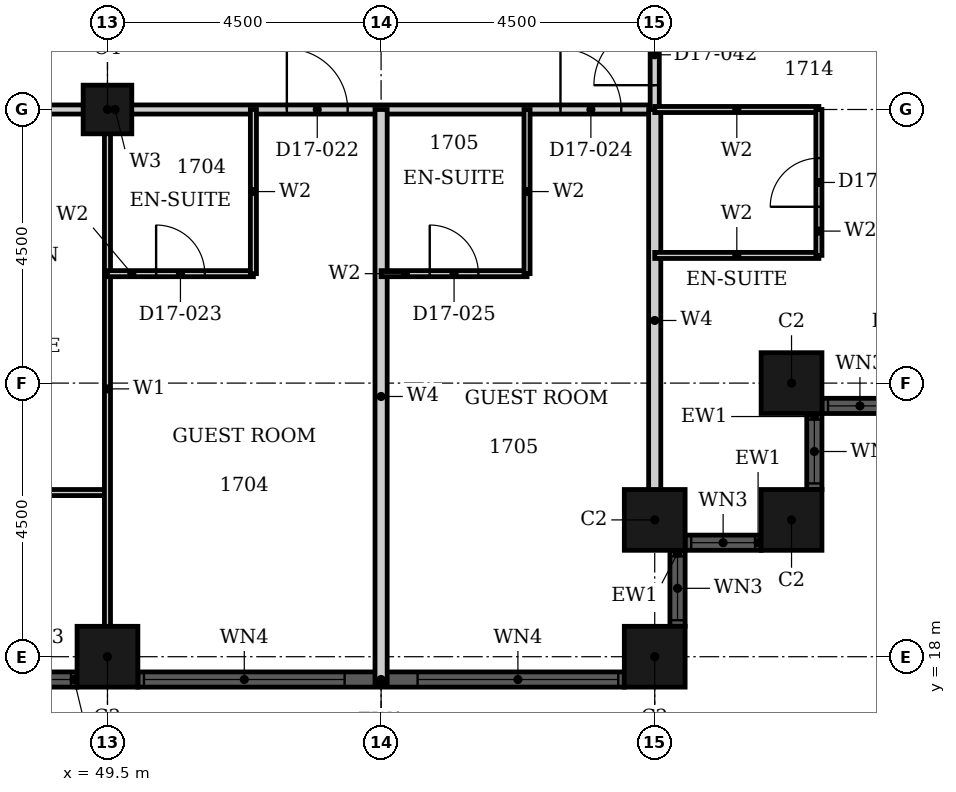
"""IFC4 building model, lengths in metres.
Left out: names, types, materials, properties, quantities, classifications, styles, units other than length and angle.
Written with IfcOpenShell. Run it as: python <this file> out.ifc"""

import sys

from ifc_helpers import new_model, si_unit, direction, frame, frame_2d, origin, origin_2d, place, context, subcontext, project, spatial, rectangle, hollow_rectangle, extrude, element, fill, save


model = new_model("IFC4")
c1 = context("Model", 3, precision=1e-05, world=origin(), true_north=direction((0.0, 1.0)))
c2 = subcontext(c1, "Body", "Model", "MODEL_VIEW")
j1 = project(units=[si_unit("LENGTHUNIT", "METRE"), si_unit("PLANEANGLEUNIT", "RADIAN")], contexts=[c1])
p1 = place(None, origin())
s1 = spatial("IfcSite", under=j1, at=p1, CompositionType="ELEMENT")
p2 = place(p1, origin())
s2 = spatial("IfcBuilding", under=s1, at=p2, CompositionType="ELEMENT")
p3 = place(p2, frame((0.0, 0.0, 74.4)))
s3 = spatial("IfcBuildingStorey", under=s2, at=p3, CompositionType="ELEMENT", Elevation=74.4)
for number, where, z_axis, x_axis in (
    (1, (49.5, 18.0, 0.0), (0.0, 0.0, 1.0), (1.0, 0.0, 0.0)),
    (2, (58.5, 18.0, 0.0), (0.0, 0.0, 1.0), (1.0, 0.0, 0.0)),
    (3, (58.5, 20.25, 0.0), (0.0, 0.0, 1.0), (1.0, 0.0, 0.0)),
    (4, (60.75, 20.25, 0.0), (0.0, 0.0, 1.0), (1.0, 0.0, 0.0)),
    (5, (60.75, 22.5, 0.0), (0.0, 0.0, 1.0), (1.0, 0.0, 0.0)),
):
    element("IfcColumn", number, at=place(p3, frame(where, z_axis=z_axis, x_axis=x_axis)), inside=s3, PredefinedType="COLUMN", context=c2, shape_type="SweptSolid", body=[
        extrude(hollow_rectangle(XDim=1.0, YDim=1.0, WallThickness=0.032, at=origin_2d()), origin(), (0.0, 0.0, 1.0), 3.6),
    ])
p4 = place(p3, frame((49.5, 27.0, 0.0), z_axis=(0.0, 0.0, 1.0), x_axis=(1.0, 0.0, 0.0)))
e6 = element("IfcColumn", 6, at=p4, inside=s3, PredefinedType="COLUMN", context=c2, shape_type="SweptSolid", body=[
    extrude(hollow_rectangle(XDim=0.8, YDim=0.8, WallThickness=0.025, at=origin_2d()), origin(), (0.0, 0.0, 1.0), 3.6),
])
p5 = place(p3, frame((47.75, 17.625, 0.0), z_axis=(0.0, 0.0, 1.0), x_axis=(1.0, 0.0, 0.0)))
e7 = element("IfcWall", 7, at=p5, inside=s3, PredefinedType="SOLIDWALL", context=c2, shape_type="SweptSolid", body=[
    extrude(rectangle(XDim=1.25, YDim=0.25, at=frame_2d((0.625, 0.0))), origin(), (0.0, 0.0, 1.0), 3.6),
])
p6 = place(p5, frame((0.1, 0.0, 0.9)))
e8 = element("IfcOpeningElement", 8, at=p6, cuts=e7, PredefinedType="OPENING", context=c2, shape_type="SweptSolid", body=[
    extrude(rectangle(XDim=1.05, YDim=2.08, at=frame_2d((0.525, 1.04))), frame((0.0, 0.135, 0.0), z_axis=(0.0, -1.0, 0.0), x_axis=(1.0, 0.0, 0.0)), (0.0, 0.0, 1.0), 0.27),
])
p7 = place(p3, frame((50.0, 17.625, 0.0), z_axis=(0.0, 0.0, 1.0), x_axis=(1.0, 0.0, 0.0)))
e9 = element("IfcWall", 9, at=p7, inside=s3, PredefinedType="SOLIDWALL", context=c2, shape_type="SweptSolid", body=[
    extrude(rectangle(XDim=8.0, YDim=0.25, at=frame_2d((4.0, 0.0))), origin(), (0.0, 0.0, 1.0), 3.6),
])
p8 = place(p7, frame((0.1, 0.0, 0.9)))
e10 = element("IfcOpeningElement", 10, at=p8, cuts=e9, PredefinedType="OPENING", context=c2, shape_type="SweptSolid", body=[
    extrude(rectangle(XDim=3.3, YDim=2.08, at=frame_2d((1.65, 1.04))), frame((0.0, 0.135, 0.0), z_axis=(0.0, -1.0, 0.0), x_axis=(1.0, 0.0, 0.0)), (0.0, 0.0, 1.0), 0.27),
])
p9 = place(p7, frame((4.6, 0.0, 0.9)))
e11 = element("IfcOpeningElement", 11, at=p9, cuts=e9, PredefinedType="OPENING", context=c2, shape_type="SweptSolid", body=[
    extrude(rectangle(XDim=3.3, YDim=2.08, at=frame_2d((1.65, 1.04))), frame((0.0, 0.135, 0.0), z_axis=(0.0, -1.0, 0.0), x_axis=(1.0, 0.0, 0.0)), (0.0, 0.0, 1.0), 0.27),
])
p10 = place(p3, frame((58.875, 18.5, 0.0), z_axis=(0.0, 0.0, 1.0), x_axis=(0.0, 1.0, 0.0)))
e12 = element("IfcWall", 12, at=p10, inside=s3, PredefinedType="SOLIDWALL", context=c2, shape_type="SweptSolid", body=[
    extrude(rectangle(XDim=1.25, YDim=0.25, at=frame_2d((0.625, 0.0))), origin(), (0.0, 0.0, 1.0), 3.6),
])
p11 = place(p10, frame((0.1, 0.0, 0.9)))
e13 = element("IfcOpeningElement", 13, at=p11, cuts=e12, PredefinedType="OPENING", context=c2, shape_type="SweptSolid", body=[
    extrude(rectangle(XDim=1.05, YDim=2.08, at=frame_2d((0.525, 1.04))), frame((0.0, 0.135, 0.0), z_axis=(0.0, -1.0, 0.0), x_axis=(1.0, 0.0, 0.0)), (0.0, 0.0, 1.0), 0.27),
])
p12 = place(p3, frame((59.0, 19.875, 0.0), z_axis=(0.0, 0.0, 1.0), x_axis=(1.0, 0.0, 0.0)))
e14 = element("IfcWall", 14, at=p12, inside=s3, PredefinedType="SOLIDWALL", context=c2, shape_type="SweptSolid", body=[
    extrude(rectangle(XDim=1.25, YDim=0.25, at=frame_2d((0.625, 0.0))), origin(), (0.0, 0.0, 1.0), 3.6),
])
p13 = place(p12, frame((0.1, 0.0, 0.9)))
e15 = element("IfcOpeningElement", 15, at=p13, cuts=e14, PredefinedType="OPENING", context=c2, shape_type="SweptSolid", body=[
    extrude(rectangle(XDim=1.05, YDim=2.08, at=frame_2d((0.525, 1.04))), frame((0.0, 0.135, 0.0), z_axis=(0.0, -1.0, 0.0), x_axis=(1.0, 0.0, 0.0)), (0.0, 0.0, 1.0), 0.27),
])
p14 = place(p3, frame((61.125, 20.75, 0.0), z_axis=(0.0, 0.0, 1.0), x_axis=(0.0, 1.0, 0.0)))
e16 = element("IfcWall", 16, at=p14, inside=s3, PredefinedType="SOLIDWALL", context=c2, shape_type="SweptSolid", body=[
    extrude(rectangle(XDim=1.25, YDim=0.25, at=frame_2d((0.625, 0.0))), origin(), (0.0, 0.0, 1.0), 3.6),
])
p15 = place(p14, frame((0.1, 0.0, 0.9)))
e17 = element("IfcOpeningElement", 17, at=p15, cuts=e16, PredefinedType="OPENING", context=c2, shape_type="SweptSolid", body=[
    extrude(rectangle(XDim=1.05, YDim=2.08, at=frame_2d((0.525, 1.04))), frame((0.0, 0.135, 0.0), z_axis=(0.0, -1.0, 0.0), x_axis=(1.0, 0.0, 0.0)), (0.0, 0.0, 1.0), 0.27),
])
p16 = place(p3, frame((61.25, 22.125, 0.0), z_axis=(0.0, 0.0, 1.0), x_axis=(1.0, 0.0, 0.0)))
e18 = element("IfcWall", 18, at=p16, inside=s3, PredefinedType="SOLIDWALL", context=c2, shape_type="SweptSolid", body=[
    extrude(rectangle(XDim=1.25, YDim=0.25, at=frame_2d((0.625, 0.0))), origin(), (0.0, 0.0, 1.0), 3.6),
])
p17 = place(p16, frame((0.1, 0.0, 0.9)))
e19 = element("IfcOpeningElement", 19, at=p17, cuts=e18, PredefinedType="OPENING", context=c2, shape_type="SweptSolid", body=[
    extrude(rectangle(XDim=1.05, YDim=2.08, at=frame_2d((0.525, 1.04))), frame((0.0, 0.135, 0.0), z_axis=(0.0, -1.0, 0.0), x_axis=(1.0, 0.0, 0.0)), (0.0, 0.0, 1.0), 0.27),
])
p18 = place(p3, frame((46.8, 27.0, 0.0), z_axis=(0.0, 0.0, 1.0), x_axis=(1.0, 0.0, 0.0)))
e20 = element("IfcWall", 20, at=p18, inside=s3, PredefinedType="PARTITIONING", context=c2, shape_type="SweptSolid", body=[
    extrude(rectangle(XDim=11.7, YDim=0.15, at=frame_2d((5.85, 0.0))), origin(), (0.0, 0.0, 1.0), 2.58),
])
p19 = place(p18, frame((5.65, 0.0, 0.0)))
e21 = element("IfcOpeningElement", 21, at=p19, cuts=e20, PredefinedType="OPENING", context=c2, shape_type="SweptSolid", body=[
    extrude(rectangle(XDim=1.0, YDim=2.1, at=frame_2d((0.5, 1.05))), frame((0.0, 0.085, 0.0), z_axis=(0.0, -1.0, 0.0), x_axis=(1.0, 0.0, 0.0)), (0.0, 0.0, 1.0), 0.17),
])
p20 = place(p18, frame((10.15, 0.0, 0.0)))
e22 = element("IfcOpeningElement", 22, at=p20, cuts=e20, PredefinedType="OPENING", context=c2, shape_type="SweptSolid", body=[
    extrude(rectangle(XDim=1.0, YDim=2.1, at=frame_2d((0.5, 1.05))), frame((0.0, 0.085, 0.0), z_axis=(0.0, -1.0, 0.0), x_axis=(1.0, 0.0, 0.0)), (0.0, 0.0, 1.0), 0.17),
])
p21 = place(p3, frame((58.5, 27.0, 0.0), z_axis=(0.0, 0.0, 1.0), x_axis=(0.0, 1.0, 0.0)))
e23 = element("IfcWall", 23, at=p21, inside=s3, PredefinedType="PARTITIONING", context=c2, shape_type="SweptSolid", body=[
    extrude(rectangle(XDim=1.8, YDim=0.15, at=frame_2d((0.9, 0.0))), origin(), (0.0, 0.0, 1.0), 3.3),
])
p22 = place(p21, frame((0.4, 0.0, 0.0)))
e24 = element("IfcOpeningElement", 24, at=p22, cuts=e23, PredefinedType="OPENING", context=c2, shape_type="SweptSolid", body=[
    extrude(rectangle(XDim=1.0, YDim=2.1, at=frame_2d((0.5, 1.05))), frame((0.0, 0.085, 0.0), z_axis=(0.0, -1.0, 0.0), x_axis=(1.0, 0.0, 0.0)), (0.0, 0.0, 1.0), 0.17),
])
p23 = place(p3, frame((46.8, 20.7, 0.0), z_axis=(0.0, 0.0, 1.0), x_axis=(1.0, 0.0, 0.0)))
e25 = element("IfcWall", 25, at=p23, inside=s3, PredefinedType="PARTITIONING", context=c2, shape_type="SweptSolid", body=[
    extrude(rectangle(XDim=2.7, YDim=0.1, at=frame_2d((1.35, 0.0))), origin(), (0.0, 0.0, 1.0), 3.3),
])
p24 = place(p3, frame((49.5, 17.81, 0.0), z_axis=(0.0, 0.0, 1.0), x_axis=(0.0, 1.0, 0.0)))
e26 = element("IfcWall", 26, at=p24, inside=s3, PredefinedType="PARTITIONING", context=c2, shape_type="SweptSolid", body=[
    extrude(rectangle(XDim=9.19, YDim=0.1, at=frame_2d((4.595, 0.0))), origin(), (0.0, 0.0, 1.0), 2.38),
])
p25 = place(p3, frame((54.0, 17.56, 0.0), z_axis=(0.0, 0.0, 1.0), x_axis=(0.0, 1.0, 0.0)))
e27 = element("IfcWall", 27, at=p25, inside=s3, PredefinedType="PARTITIONING", context=c2, shape_type="SweptSolid", body=[
    extrude(rectangle(XDim=9.44, YDim=0.2, at=frame_2d((4.72, 0.0))), origin(), (0.0, 0.0, 1.0), 3.3),
])
p26 = place(p3, frame((58.5, 20.06, 0.0), z_axis=(0.0, 0.0, 1.0), x_axis=(0.0, 1.0, 0.0)))
e28 = element("IfcWall", 28, at=p26, inside=s3, PredefinedType="PARTITIONING", context=c2, shape_type="SweptSolid", body=[
    extrude(rectangle(XDim=6.94, YDim=0.2, at=frame_2d((3.47, 0.0))), origin(), (0.0, 0.0, 1.0), 3.3),
])
p27 = place(p3, frame((49.5, 24.3, 0.0), z_axis=(0.0, 0.0, 1.0), x_axis=(1.0, 0.0, 0.0)))
e29 = element("IfcWall", 29, at=p27, inside=s3, PredefinedType="PARTITIONING", context=c2, shape_type="SweptSolid", body=[
    extrude(rectangle(XDim=2.4, YDim=0.1, at=frame_2d((1.2, 0.0))), origin(), (0.0, 0.0, 1.0), 3.3),
])
p28 = place(p27, frame((0.8, 0.0, 0.0)))
e30 = element("IfcOpeningElement", 30, at=p28, cuts=e29, PredefinedType="OPENING", context=c2, shape_type="SweptSolid", body=[
    extrude(rectangle(XDim=0.8, YDim=2.1, at=frame_2d((0.4, 1.05))), frame((0.0, 0.06, 0.0), z_axis=(0.0, -1.0, 0.0), x_axis=(1.0, 0.0, 0.0)), (0.0, 0.0, 1.0), 0.12),
])
p29 = place(p3, frame((54.0, 24.3, 0.0), z_axis=(0.0, 0.0, 1.0), x_axis=(1.0, 0.0, 0.0)))
e31 = element("IfcWall", 31, at=p29, inside=s3, PredefinedType="PARTITIONING", context=c2, shape_type="SweptSolid", body=[
    extrude(rectangle(XDim=2.4, YDim=0.1, at=frame_2d((1.2, 0.0))), origin(), (0.0, 0.0, 1.0), 3.3),
])
p30 = place(p29, frame((0.8, 0.0, 0.0)))
e32 = element("IfcOpeningElement", 32, at=p30, cuts=e31, PredefinedType="OPENING", context=c2, shape_type="SweptSolid", body=[
    extrude(rectangle(XDim=0.8, YDim=2.1, at=frame_2d((0.4, 1.05))), frame((0.0, 0.06, 0.0), z_axis=(0.0, -1.0, 0.0), x_axis=(1.0, 0.0, 0.0)), (0.0, 0.0, 1.0), 0.12),
])
p31 = place(p3, frame((58.5, 24.6, 0.0), z_axis=(0.0, 0.0, 1.0), x_axis=(1.0, 0.0, 0.0)))
e33 = element("IfcWall", 33, at=p31, inside=s3, PredefinedType="PARTITIONING", context=c2, shape_type="SweptSolid", body=[
    extrude(rectangle(XDim=2.7, YDim=0.1, at=frame_2d((1.35, 0.0))), origin(), (0.0, 0.0, 1.0), 3.3),
])
p32 = place(p3, frame((58.5, 27.0, 0.0), z_axis=(0.0, 0.0, 1.0), x_axis=(1.0, 0.0, 0.0)))
e34 = element("IfcWall", 34, at=p32, inside=s3, PredefinedType="PARTITIONING", context=c2, shape_type="SweptSolid", body=[
    extrude(rectangle(XDim=2.7, YDim=0.1, at=frame_2d((1.35, 0.0))), origin(), (0.0, 0.0, 1.0), 2.58),
])
for number, where, z_axis, x_axis in (
    (35, (51.9, 24.3, 0.0), (0.0, 0.0, 1.0), (0.0, 1.0, 0.0)),
    (36, (56.4, 24.3, 0.0), (0.0, 0.0, 1.0), (0.0, 1.0, 0.0)),
):
    element("IfcWall", number, at=place(p3, frame(where, z_axis=z_axis, x_axis=x_axis)), inside=s3, PredefinedType="PARTITIONING", context=c2, shape_type="SweptSolid", body=[
        extrude(rectangle(XDim=2.7, YDim=0.1, at=frame_2d((1.35, 0.0))), origin(), (0.0, 0.0, 1.0), 3.3),
    ])
p33 = place(p3, frame((61.2, 24.6, 0.0), z_axis=(0.0, 0.0, 1.0), x_axis=(0.0, 1.0, 0.0)))
e37 = element("IfcWall", 37, at=p33, inside=s3, PredefinedType="PARTITIONING", context=c2, shape_type="SweptSolid", body=[
    extrude(rectangle(XDim=2.4, YDim=0.1, at=frame_2d((1.2, 0.0))), origin(), (0.0, 0.0, 1.0), 3.3),
])
p34 = place(p33, frame((0.8, 0.0, 0.0)))
e38 = element("IfcOpeningElement", 38, at=p34, cuts=e37, PredefinedType="OPENING", context=c2, shape_type="SweptSolid", body=[
    extrude(rectangle(XDim=0.8, YDim=2.1, at=frame_2d((0.4, 1.05))), frame((0.0, 0.06, 0.0), z_axis=(0.0, -1.0, 0.0), x_axis=(1.0, 0.0, 0.0)), (0.0, 0.0, 1.0), 0.12),
])
p35 = place(p6, origin())
e39 = element("IfcWindow", 39, at=p35, inside=s3, PartitioningType="SINGLE_PANEL", PredefinedType="WINDOW", context=c2, shape_type="SweptSolid", body=[
    extrude(rectangle(XDim=1.05, YDim=2.08, at=frame_2d((0.525, 1.04))), frame((0.0, 0.03, 0.0), z_axis=(0.0, -1.0, 0.0), x_axis=(1.0, 0.0, 0.0)), (0.0, 0.0, 1.0), 0.06),
])
fill(e8, e39)
p36 = place(p8, origin())
e40 = element("IfcWindow", 40, at=p36, inside=s3, PartitioningType="SINGLE_PANEL", PredefinedType="WINDOW", context=c2, shape_type="SweptSolid", body=[
    extrude(rectangle(XDim=3.3, YDim=2.08, at=frame_2d((1.65, 1.04))), frame((0.0, 0.03, 0.0), z_axis=(0.0, -1.0, 0.0), x_axis=(1.0, 0.0, 0.0)), (0.0, 0.0, 1.0), 0.06),
])
fill(e10, e40)
p37 = place(p9, origin())
e41 = element("IfcWindow", 41, at=p37, inside=s3, PartitioningType="SINGLE_PANEL", PredefinedType="WINDOW", context=c2, shape_type="SweptSolid", body=[
    extrude(rectangle(XDim=3.3, YDim=2.08, at=frame_2d((1.65, 1.04))), frame((0.0, 0.03, 0.0), z_axis=(0.0, -1.0, 0.0), x_axis=(1.0, 0.0, 0.0)), (0.0, 0.0, 1.0), 0.06),
])
fill(e11, e41)
p38 = place(p11, origin())
e42 = element("IfcWindow", 42, at=p38, inside=s3, PartitioningType="SINGLE_PANEL", PredefinedType="WINDOW", context=c2, shape_type="SweptSolid", body=[
    extrude(rectangle(XDim=1.05, YDim=2.08, at=frame_2d((0.525, 1.04))), frame((0.0, 0.03, 0.0), z_axis=(0.0, -1.0, 0.0), x_axis=(1.0, 0.0, 0.0)), (0.0, 0.0, 1.0), 0.06),
])
fill(e13, e42)
p39 = place(p13, origin())
e43 = element("IfcWindow", 43, at=p39, inside=s3, PartitioningType="SINGLE_PANEL", PredefinedType="WINDOW", context=c2, shape_type="SweptSolid", body=[
    extrude(rectangle(XDim=1.05, YDim=2.08, at=frame_2d((0.525, 1.04))), frame((0.0, 0.03, 0.0), z_axis=(0.0, -1.0, 0.0), x_axis=(1.0, 0.0, 0.0)), (0.0, 0.0, 1.0), 0.06),
])
fill(e15, e43)
p40 = place(p15, origin())
e44 = element("IfcWindow", 44, at=p40, inside=s3, PartitioningType="SINGLE_PANEL", PredefinedType="WINDOW", context=c2, shape_type="SweptSolid", body=[
    extrude(rectangle(XDim=1.05, YDim=2.08, at=frame_2d((0.525, 1.04))), frame((0.0, 0.03, 0.0), z_axis=(0.0, -1.0, 0.0), x_axis=(1.0, 0.0, 0.0)), (0.0, 0.0, 1.0), 0.06),
])
fill(e17, e44)
p41 = place(p17, origin())
e45 = element("IfcWindow", 45, at=p41, inside=s3, PartitioningType="SINGLE_PANEL", PredefinedType="WINDOW", context=c2, shape_type="SweptSolid", body=[
    extrude(rectangle(XDim=1.05, YDim=2.08, at=frame_2d((0.525, 1.04))), frame((0.0, 0.03, 0.0), z_axis=(0.0, -1.0, 0.0), x_axis=(1.0, 0.0, 0.0)), (0.0, 0.0, 1.0), 0.06),
])
fill(e19, e45)
p42 = place(p19, origin())
e46 = element("IfcDoor", 46, at=p42, inside=s3, OperationType="SINGLE_SWING_RIGHT", PredefinedType="DOOR", context=c2, shape_type="SweptSolid", body=[
    extrude(rectangle(XDim=1.0, YDim=2.1, at=frame_2d((0.5, 1.05))), frame((0.0, 0.025, 0.0), z_axis=(0.0, -1.0, 0.0), x_axis=(1.0, 0.0, 0.0)), (0.0, 0.0, 1.0), 0.05),
])
fill(e21, e46)
p43 = place(p28, origin())
e47 = element("IfcDoor", 47, at=p43, inside=s3, OperationType="SINGLE_SWING_RIGHT", PredefinedType="DOOR", context=c2, shape_type="SweptSolid", body=[
    extrude(rectangle(XDim=0.8, YDim=2.1, at=frame_2d((0.4, 1.05))), frame((0.0, 0.025, 0.0), z_axis=(0.0, -1.0, 0.0), x_axis=(1.0, 0.0, 0.0)), (0.0, 0.0, 1.0), 0.05),
])
fill(e30, e47)
p44 = place(p20, origin())
e48 = element("IfcDoor", 48, at=p44, inside=s3, OperationType="SINGLE_SWING_RIGHT", PredefinedType="DOOR", context=c2, shape_type="SweptSolid", body=[
    extrude(rectangle(XDim=1.0, YDim=2.1, at=frame_2d((0.5, 1.05))), frame((0.0, 0.025, 0.0), z_axis=(0.0, -1.0, 0.0), x_axis=(1.0, 0.0, 0.0)), (0.0, 0.0, 1.0), 0.05),
])
fill(e22, e48)
p45 = place(p30, origin())
e49 = element("IfcDoor", 49, at=p45, inside=s3, OperationType="SINGLE_SWING_LEFT", PredefinedType="DOOR", context=c2, shape_type="SweptSolid", body=[
    extrude(rectangle(XDim=0.8, YDim=2.1, at=frame_2d((0.4, 1.05))), frame((0.0, 0.025, 0.0), z_axis=(0.0, -1.0, 0.0), x_axis=(1.0, 0.0, 0.0)), (0.0, 0.0, 1.0), 0.05),
])
fill(e32, e49)
p46 = place(p22, origin())
e50 = element("IfcDoor", 50, at=p46, inside=s3, OperationType="SINGLE_SWING_RIGHT", PredefinedType="DOOR", context=c2, shape_type="SweptSolid", body=[
    extrude(rectangle(XDim=1.0, YDim=2.1, at=frame_2d((0.5, 1.05))), frame((0.0, 0.025, 0.0), z_axis=(0.0, -1.0, 0.0), x_axis=(1.0, 0.0, 0.0)), (0.0, 0.0, 1.0), 0.05),
])
fill(e24, e50)
p47 = place(p34, origin())
e51 = element("IfcDoor", 51, at=p47, inside=s3, OperationType="SINGLE_SWING_RIGHT", PredefinedType="DOOR", context=c2, shape_type="SweptSolid", body=[
    extrude(rectangle(XDim=0.8, YDim=2.1, at=frame_2d((0.4, 1.05))), frame((0.0, 0.025, 0.0), z_axis=(0.0, -1.0, 0.0), x_axis=(1.0, 0.0, 0.0)), (0.0, 0.0, 1.0), 0.05),
])
fill(e38, e51)
save(model, sys.argv[1])
